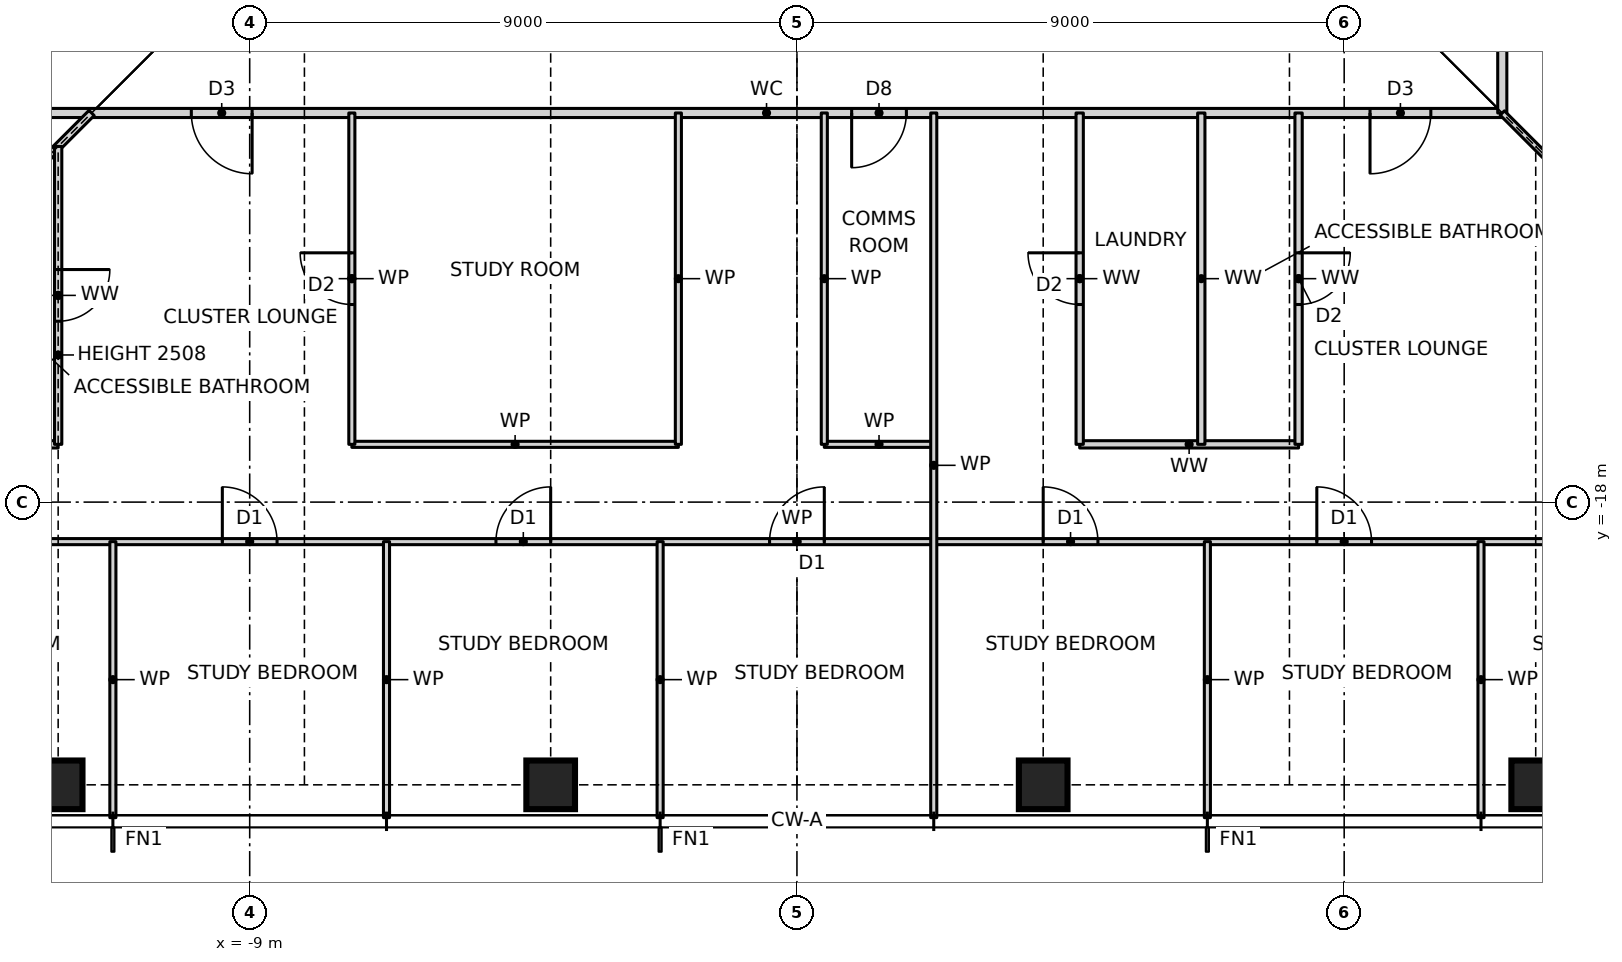
"""IFC4 building model, lengths in metres.
Left out: names, types, materials, properties, quantities, classifications, styles, units other than length and angle.
Written with IfcOpenShell. Run it as: python <this file> out.ifc"""

import sys

from ifc_helpers import new_model, si_unit, direction, frame, frame_2d, origin, origin_2d, place, context, subcontext, project, spatial, rectangle, hollow_rectangle, extrude, element, fill, save


model = new_model("IFC4")
c1 = context("Model", 3, precision=1e-05, world=origin(), true_north=direction((0.0, 1.0)))
c2 = subcontext(c1, "Body", "Model", "MODEL_VIEW")
j1 = project(units=[si_unit("LENGTHUNIT", "METRE"), si_unit("PLANEANGLEUNIT", "RADIAN")], contexts=[c1])
p1 = place(None, origin())
s1 = spatial("IfcSite", under=j1, at=p1, CompositionType="ELEMENT")
p2 = place(p1, origin())
s2 = spatial("IfcBuilding", under=s1, at=p2, CompositionType="ELEMENT")
p3 = place(p2, frame((0.0, 0.0, 46.5)))
s3 = spatial("IfcBuildingStorey", under=s2, at=p3, CompositionType="ELEMENT", Elevation=46.5)
for number, where, z_axis, x_axis in (
    (1, (-12.15, -22.65, 0.0), (0.0, 0.0, 1.0), (1.0, 0.0, 0.0)),
    (2, (-4.05, -22.65, 0.0), (0.0, 0.0, 1.0), (1.0, 0.0, 0.0)),
    (3, (4.05, -22.65, 0.0), (0.0, 0.0, 1.0), (1.0, 0.0, 0.0)),
    (4, (12.15, -22.65, 0.0), (0.0, 0.0, 1.0), (1.0, 0.0, 0.0)),
):
    element("IfcColumn", number, at=place(p3, frame(where, z_axis=z_axis, x_axis=x_axis)), inside=s3, PredefinedType="COLUMN", context=c2, shape_type="SweptSolid", body=[
        extrude(hollow_rectangle(XDim=0.8, YDim=0.8, WallThickness=0.09, at=origin_2d()), origin(), (0.0, 0.0, 1.0), 3.5),
    ])
p4 = place(p3, frame((-15.75, -18.65, 0.0), z_axis=(0.0, 0.0, 1.0), x_axis=(1.0, 0.0, 0.0)))
e5 = element("IfcWall", 5, at=p4, inside=s3, PredefinedType="PARTITIONING", context=c2, shape_type="SweptSolid", body=[
    extrude(rectangle(XDim=31.5, YDim=0.1, at=frame_2d((15.75, 0.0))), origin(), (0.0, 0.0, 1.0), 3.27),
])
p5 = place(p4, frame((1.8, 0.0, 0.0)))
e6 = element("IfcOpeningElement", 6, at=p5, cuts=e5, PredefinedType="OPENING", context=c2, shape_type="SweptSolid", body=[
    extrude(rectangle(XDim=0.9, YDim=2.1, at=frame_2d((0.45, 1.05))), frame((0.0, 0.06, 0.0), z_axis=(0.0, -1.0, 0.0), x_axis=(1.0, 0.0, 0.0)), (0.0, 0.0, 1.0), 0.12),
])
p6 = place(p4, frame((6.3, 0.0, 0.0)))
e7 = element("IfcOpeningElement", 7, at=p6, cuts=e5, PredefinedType="OPENING", context=c2, shape_type="SweptSolid", body=[
    extrude(rectangle(XDim=0.9, YDim=2.1, at=frame_2d((0.45, 1.05))), frame((0.0, 0.06, 0.0), z_axis=(0.0, -1.0, 0.0), x_axis=(1.0, 0.0, 0.0)), (0.0, 0.0, 1.0), 0.12),
])
p7 = place(p4, frame((10.8, 0.0, 0.0)))
e8 = element("IfcOpeningElement", 8, at=p7, cuts=e5, PredefinedType="OPENING", context=c2, shape_type="SweptSolid", body=[
    extrude(rectangle(XDim=0.9, YDim=2.1, at=frame_2d((0.45, 1.05))), frame((0.0, 0.06, 0.0), z_axis=(0.0, -1.0, 0.0), x_axis=(1.0, 0.0, 0.0)), (0.0, 0.0, 1.0), 0.12),
])
p8 = place(p4, frame((15.3, 0.0, 0.0)))
e9 = element("IfcOpeningElement", 9, at=p8, cuts=e5, PredefinedType="OPENING", context=c2, shape_type="SweptSolid", body=[
    extrude(rectangle(XDim=0.9, YDim=2.1, at=frame_2d((0.45, 1.05))), frame((0.0, 0.06, 0.0), z_axis=(0.0, -1.0, 0.0), x_axis=(1.0, 0.0, 0.0)), (0.0, 0.0, 1.0), 0.12),
])
p9 = place(p4, frame((19.8, 0.0, 0.0)))
e10 = element("IfcOpeningElement", 10, at=p9, cuts=e5, PredefinedType="OPENING", context=c2, shape_type="SweptSolid", body=[
    extrude(rectangle(XDim=0.9, YDim=2.1, at=frame_2d((0.45, 1.05))), frame((0.0, 0.06, 0.0), z_axis=(0.0, -1.0, 0.0), x_axis=(1.0, 0.0, 0.0)), (0.0, 0.0, 1.0), 0.12),
])
p10 = place(p4, frame((24.3, 0.0, 0.0)))
e11 = element("IfcOpeningElement", 11, at=p10, cuts=e5, PredefinedType="OPENING", context=c2, shape_type="SweptSolid", body=[
    extrude(rectangle(XDim=0.9, YDim=2.1, at=frame_2d((0.45, 1.05))), frame((0.0, 0.06, 0.0), z_axis=(0.0, -1.0, 0.0), x_axis=(1.0, 0.0, 0.0)), (0.0, 0.0, 1.0), 0.12),
])
p11 = place(p4, frame((28.8, 0.0, 0.0)))
e12 = element("IfcOpeningElement", 12, at=p11, cuts=e5, PredefinedType="OPENING", context=c2, shape_type="SweptSolid", body=[
    extrude(rectangle(XDim=0.9, YDim=2.1, at=frame_2d((0.45, 1.05))), frame((0.0, 0.06, 0.0), z_axis=(0.0, -1.0, 0.0), x_axis=(1.0, 0.0, 0.0)), (0.0, 0.0, 1.0), 0.12),
])
p12 = place(p3, frame((-15.75, -17.05, 0.0), z_axis=(0.0, 0.0, 1.0), x_axis=(1.0, 0.0, 0.0)))
e13 = element("IfcWall", 13, at=p12, inside=s3, PredefinedType="PARTITIONING", context=c2, shape_type="SweptSolid", body=[
    extrude(rectangle(XDim=3.6, YDim=0.12, at=frame_2d((1.8, 0.0))), origin(), (0.0, 0.0, 1.0), 3.27),
])
p13 = place(p12, frame((0.575, 0.0, 0.0)))
e14 = element("IfcOpeningElement", 14, at=p13, cuts=e13, PredefinedType="OPENING", context=c2, shape_type="SweptSolid", body=[
    extrude(rectangle(XDim=0.85, YDim=2.1, at=frame_2d((0.425, 1.05))), frame((0.0, 0.07, 0.0), z_axis=(0.0, -1.0, 0.0), x_axis=(1.0, 0.0, 0.0)), (0.0, 0.0, 1.0), 0.14),
])
p14 = place(p3, frame((-7.32, -17.05, 0.0), z_axis=(0.0, 0.0, 1.0), x_axis=(1.0, 0.0, 0.0)))
e15 = element("IfcWall", 15, at=p14, inside=s3, PredefinedType="PARTITIONING", context=c2, shape_type="SweptSolid", body=[
    extrude(rectangle(XDim=5.37, YDim=0.1, at=frame_2d((2.685, 0.0))), origin(), (0.0, 0.0, 1.0), 3.27),
])
p15 = place(p3, frame((0.45, -17.05, 0.0), z_axis=(0.0, 0.0, 1.0), x_axis=(1.0, 0.0, 0.0)))
e16 = element("IfcWall", 16, at=p15, inside=s3, PredefinedType="PARTITIONING", context=c2, shape_type="SweptSolid", body=[
    extrude(rectangle(XDim=1.8, YDim=0.1, at=frame_2d((0.9, 0.0))), origin(), (0.0, 0.0, 1.0), 3.27),
])
p16 = place(p3, frame((4.65, -17.05, 0.0), z_axis=(0.0, 0.0, 1.0), x_axis=(1.0, 0.0, 0.0)))
e17 = element("IfcWall", 17, at=p16, inside=s3, PredefinedType="PARTITIONING", context=c2, shape_type="SweptSolid", body=[
    extrude(rectangle(XDim=3.6, YDim=0.12, at=frame_2d((1.8, 0.0))), origin(), (0.0, 0.0, 1.0), 3.27),
])
p17 = place(p3, frame((-12.6, -11.6, 0.0), z_axis=(0.0, 0.0, 1.0), x_axis=(1.0, 0.0, 0.0)))
e18 = element("IfcWall", 18, at=p17, inside=s3, PredefinedType="PARTITIONING", context=c2, shape_type="SweptSolid", body=[
    extrude(rectangle(XDim=24.2, YDim=0.15, at=frame_2d((12.1, 0.0))), origin(), (0.0, 0.0, 1.0), 3.27),
])
p18 = place(p17, frame((2.64, 0.0, 0.0)))
e19 = element("IfcOpeningElement", 19, at=p18, cuts=e18, PredefinedType="OPENING", context=c2, shape_type="SweptSolid", body=[
    extrude(rectangle(XDim=1.0, YDim=2.1, at=frame_2d((0.5, 1.05))), frame((0.0, 0.085, 0.0), z_axis=(0.0, -1.0, 0.0), x_axis=(1.0, 0.0, 0.0)), (0.0, 0.0, 1.0), 0.17),
])
p19 = place(p17, frame((13.5, 0.0, 0.0)))
e20 = element("IfcOpeningElement", 20, at=p19, cuts=e18, PredefinedType="OPENING", context=c2, shape_type="SweptSolid", body=[
    extrude(rectangle(XDim=0.9, YDim=2.1, at=frame_2d((0.45, 1.05))), frame((0.0, 0.085, 0.0), z_axis=(0.0, -1.0, 0.0), x_axis=(1.0, 0.0, 0.0)), (0.0, 0.0, 1.0), 0.17),
])
p20 = place(p17, frame((22.025, 0.0, 0.0)))
e21 = element("IfcOpeningElement", 21, at=p20, cuts=e18, PredefinedType="OPENING", context=c2, shape_type="SweptSolid", body=[
    extrude(rectangle(XDim=1.0, YDim=2.1, at=frame_2d((0.5, 1.05))), frame((0.0, 0.085, 0.0), z_axis=(0.0, -1.0, 0.0), x_axis=(1.0, 0.0, 0.0)), (0.0, 0.0, 1.0), 0.17),
])
p21 = place(p3, frame((-15.75, -15.75, 0.0), z_axis=(0.0, 0.0, 1.0), x_axis=(0.707106781187, 0.707106781187, 0.0)))
e22 = element("IfcWall", 22, at=p21, inside=s3, PredefinedType="PARTITIONING", context=c2, shape_type="SweptSolid", body=[
    extrude(rectangle(XDim=5.869, YDim=0.12, at=frame_2d((2.935, 0.0))), origin(), (0.0, 0.0, 1.0), 2.343),
])
p22 = place(p3, frame((11.6, -11.6, 0.0), z_axis=(0.0, 0.0, 1.0), x_axis=(0.0, 1.0, 0.0)))
e23 = element("IfcWall", 23, at=p22, inside=s3, PredefinedType="PARTITIONING", context=c2, shape_type="SweptSolid", body=[
    extrude(rectangle(XDim=23.2, YDim=0.15, at=frame_2d((11.6, 0.0))), origin(), (0.0, 0.0, 1.0), 3.27),
])
p23 = place(p22, frame((20.55, 0.0, 0.0)))
e24 = element("IfcOpeningElement", 24, at=p23, cuts=e23, PredefinedType="OPENING", context=c2, shape_type="SweptSolid", body=[
    extrude(rectangle(XDim=1.0, YDim=2.1, at=frame_2d((0.5, 1.05))), frame((0.0, 0.085, 0.0), z_axis=(0.0, -1.0, 0.0), x_axis=(1.0, 0.0, 0.0)), (0.0, 0.0, 1.0), 0.17),
])
p24 = place(p3, frame((11.25, -23.19, 0.0), z_axis=(0.0, 0.0, 1.0), x_axis=(0.0, 1.0, 0.0)))
e25 = element("IfcWall", 25, at=p24, inside=s3, PredefinedType="PARTITIONING", context=c2, shape_type="SweptSolid", body=[
    extrude(rectangle(XDim=4.54, YDim=0.1, at=frame_2d((2.27, 0.0))), origin(), (0.0, 0.0, 1.0), 3.27),
])
p25 = place(p3, frame((8.25, -17.05, 0.0), z_axis=(0.0, 0.0, 1.0), x_axis=(0.0, 1.0, 0.0)))
e26 = element("IfcWall", 26, at=p25, inside=s3, PredefinedType="PARTITIONING", context=c2, shape_type="SweptSolid", body=[
    extrude(rectangle(XDim=5.45, YDim=0.12, at=frame_2d((2.725, 0.0))), origin(), (0.0, 0.0, 1.0), 3.27),
])
p26 = place(p25, frame((2.3, 0.0, 0.0)))
e27 = element("IfcOpeningElement", 27, at=p26, cuts=e26, PredefinedType="OPENING", context=c2, shape_type="SweptSolid", body=[
    extrude(rectangle(XDim=0.85, YDim=2.1, at=frame_2d((0.425, 1.05))), frame((0.0, 0.07, 0.0), z_axis=(0.0, -1.0, 0.0), x_axis=(1.0, 0.0, 0.0)), (0.0, 0.0, 1.0), 0.14),
])
p27 = place(p3, frame((6.75, -23.19, 0.0), z_axis=(0.0, 0.0, 1.0), x_axis=(0.0, 1.0, 0.0)))
e28 = element("IfcWall", 28, at=p27, inside=s3, PredefinedType="PARTITIONING", context=c2, shape_type="SweptSolid", body=[
    extrude(rectangle(XDim=4.54, YDim=0.1, at=frame_2d((2.27, 0.0))), origin(), (0.0, 0.0, 1.0), 3.27),
])
p28 = place(p3, frame((6.65, -17.05, 0.0), z_axis=(0.0, 0.0, 1.0), x_axis=(0.0, 1.0, 0.0)))
e29 = element("IfcWall", 29, at=p28, inside=s3, PredefinedType="PARTITIONING", context=c2, shape_type="SweptSolid", body=[
    extrude(rectangle(XDim=5.45, YDim=0.12, at=frame_2d((2.725, 0.0))), origin(), (0.0, 0.0, 1.0), 3.27),
])
p29 = place(p3, frame((4.65, -17.05, 0.0), z_axis=(0.0, 0.0, 1.0), x_axis=(0.0, 1.0, 0.0)))
e30 = element("IfcWall", 30, at=p29, inside=s3, PredefinedType="PARTITIONING", context=c2, shape_type="SweptSolid", body=[
    extrude(rectangle(XDim=5.45, YDim=0.12, at=frame_2d((2.725, 0.0))), origin(), (0.0, 0.0, 1.0), 3.27),
])
p30 = place(p29, frame((2.3, 0.0, 0.0)))
e31 = element("IfcOpeningElement", 31, at=p30, cuts=e30, PredefinedType="OPENING", context=c2, shape_type="SweptSolid", body=[
    extrude(rectangle(XDim=0.85, YDim=2.1, at=frame_2d((0.425, 1.05))), frame((0.0, 0.07, 0.0), z_axis=(0.0, -1.0, 0.0), x_axis=(1.0, 0.0, 0.0)), (0.0, 0.0, 1.0), 0.14),
])
p31 = place(p3, frame((2.25, -23.19, 0.0), z_axis=(0.0, 0.0, 1.0), x_axis=(0.0, 1.0, 0.0)))
e32 = element("IfcWall", 32, at=p31, inside=s3, PredefinedType="PARTITIONING", context=c2, shape_type="SweptSolid", body=[
    extrude(rectangle(XDim=11.59, YDim=0.1, at=frame_2d((5.795, 0.0))), origin(), (0.0, 0.0, 1.0), 3.27),
])
for number, where, z_axis, x_axis in (
    (33, (0.45, -17.05, 0.0), (0.0, 0.0, 1.0), (0.0, 1.0, 0.0)),
    (34, (-1.95, -17.05, 0.0), (0.0, 0.0, 1.0), (0.0, 1.0, 0.0)),
):
    element("IfcWall", number, at=place(p3, frame(where, z_axis=z_axis, x_axis=x_axis)), inside=s3, PredefinedType="PARTITIONING", context=c2, shape_type="SweptSolid", body=[
        extrude(rectangle(XDim=5.45, YDim=0.1, at=frame_2d((2.725, 0.0))), origin(), (0.0, 0.0, 1.0), 3.27),
    ])
for number, where, z_axis, x_axis in (
    (35, (-2.25, -23.19, 0.0), (0.0, 0.0, 1.0), (0.0, 1.0, 0.0)),
    (36, (-6.75, -23.19, 0.0), (0.0, 0.0, 1.0), (0.0, 1.0, 0.0)),
):
    element("IfcWall", number, at=place(p3, frame(where, z_axis=z_axis, x_axis=x_axis)), inside=s3, PredefinedType="PARTITIONING", context=c2, shape_type="SweptSolid", body=[
        extrude(rectangle(XDim=4.54, YDim=0.1, at=frame_2d((2.27, 0.0))), origin(), (0.0, 0.0, 1.0), 3.27),
    ])
p32 = place(p3, frame((-7.32, -17.05, 0.0), z_axis=(0.0, 0.0, 1.0), x_axis=(0.0, 1.0, 0.0)))
e37 = element("IfcWall", 37, at=p32, inside=s3, PredefinedType="PARTITIONING", context=c2, shape_type="SweptSolid", body=[
    extrude(rectangle(XDim=5.45, YDim=0.1, at=frame_2d((2.725, 0.0))), origin(), (0.0, 0.0, 1.0), 3.27),
])
p33 = place(p32, frame((2.3, 0.0, 0.0)))
e38 = element("IfcOpeningElement", 38, at=p33, cuts=e37, PredefinedType="OPENING", context=c2, shape_type="SweptSolid", body=[
    extrude(rectangle(XDim=0.85, YDim=2.1, at=frame_2d((0.425, 1.05))), frame((0.0, 0.06, 0.0), z_axis=(0.0, -1.0, 0.0), x_axis=(1.0, 0.0, 0.0)), (0.0, 0.0, 1.0), 0.12),
])
p34 = place(p3, frame((-11.25, -23.19, 0.0), z_axis=(0.0, 0.0, 1.0), x_axis=(0.0, 1.0, 0.0)))
e39 = element("IfcWall", 39, at=p34, inside=s3, PredefinedType="PARTITIONING", context=c2, shape_type="SweptSolid", body=[
    extrude(rectangle(XDim=4.54, YDim=0.1, at=frame_2d((2.27, 0.0))), origin(), (0.0, 0.0, 1.0), 3.27),
])
p35 = place(p3, frame((-12.15, -17.05, 0.0), z_axis=(0.0, 0.0, 1.0), x_axis=(0.0, 1.0, 0.0)))
e40 = element("IfcWall", 40, at=p35, inside=s3, PredefinedType="PARTITIONING", context=c2, shape_type="SweptSolid", body=[
    extrude(rectangle(XDim=4.9, YDim=0.12, at=frame_2d((2.45, 0.0))), origin(), (0.0, 0.0, 1.0), 2.508),
])
p36 = place(p35, frame((2.025, 0.0, 0.0)))
e41 = element("IfcOpeningElement", 41, at=p36, cuts=e40, PredefinedType="OPENING", context=c2, shape_type="SweptSolid", body=[
    extrude(rectangle(XDim=0.85, YDim=2.1, at=frame_2d((0.425, 1.05))), frame((0.0, 0.07, 0.0), z_axis=(0.0, -1.0, 0.0), x_axis=(1.0, 0.0, 0.0)), (0.0, 0.0, 1.0), 0.14),
])
p37 = place(p3, frame((15.75, -15.75, 0.0), z_axis=(0.0, 0.0, 1.0), x_axis=(-0.707106781187, 0.707106781187, 0.0)))
e42 = element("IfcWall", 42, at=p37, inside=s3, PredefinedType="PARTITIONING", context=c2, shape_type="SweptSolid", body=[
    extrude(rectangle(XDim=5.869, YDim=0.1, at=frame_2d((2.935, 0.0))), origin(), (0.0, 0.0, 1.0), 2.343),
])
p38 = place(p6, origin())
e43 = element("IfcDoor", 43, at=p38, inside=s3, OperationType="SINGLE_SWING_LEFT", PredefinedType="DOOR", context=c2, shape_type="SweptSolid", body=[
    extrude(rectangle(XDim=0.9, YDim=2.1, at=frame_2d((0.45, 1.05))), frame((0.0, 0.025, 0.0), z_axis=(0.0, -1.0, 0.0), x_axis=(1.0, 0.0, 0.0)), (0.0, 0.0, 1.0), 0.05),
])
fill(e7, e43)
p39 = place(p7, origin())
e44 = element("IfcDoor", 44, at=p39, inside=s3, OperationType="SINGLE_SWING_RIGHT", PredefinedType="DOOR", context=c2, shape_type="SweptSolid", body=[
    extrude(rectangle(XDim=0.9, YDim=2.1, at=frame_2d((0.45, 1.05))), frame((0.0, 0.025, 0.0), z_axis=(0.0, -1.0, 0.0), x_axis=(1.0, 0.0, 0.0)), (0.0, 0.0, 1.0), 0.05),
])
fill(e8, e44)
p40 = place(p8, origin())
e45 = element("IfcDoor", 45, at=p40, inside=s3, OperationType="SINGLE_SWING_RIGHT", PredefinedType="DOOR", context=c2, shape_type="SweptSolid", body=[
    extrude(rectangle(XDim=0.9, YDim=2.1, at=frame_2d((0.45, 1.05))), frame((0.0, 0.025, 0.0), z_axis=(0.0, -1.0, 0.0), x_axis=(1.0, 0.0, 0.0)), (0.0, 0.0, 1.0), 0.05),
])
fill(e9, e45)
p41 = place(p18, frame((1.0, 0.0, 0.0), z_axis=(0.0, 0.0, 1.0), x_axis=(-1.0, 0.0, 0.0)))
e46 = element("IfcDoor", 46, at=p41, inside=s3, OperationType="SINGLE_SWING_LEFT", PredefinedType="DOOR", context=c2, shape_type="SweptSolid", body=[
    extrude(rectangle(XDim=1.0, YDim=2.1, at=frame_2d((0.5, 1.05))), frame((0.0, 0.025, 0.0), z_axis=(0.0, -1.0, 0.0), x_axis=(1.0, 0.0, 0.0)), (0.0, 0.0, 1.0), 0.05),
])
fill(e19, e46)
p42 = place(p36, frame((0.85, 0.0, 0.0), z_axis=(0.0, 0.0, 1.0), x_axis=(-1.0, 0.0, 0.0)))
e47 = element("IfcDoor", 47, at=p42, inside=s3, OperationType="SINGLE_SWING_LEFT", PredefinedType="DOOR", context=c2, shape_type="SweptSolid", body=[
    extrude(rectangle(XDim=0.85, YDim=2.1, at=frame_2d((0.425, 1.05))), frame((0.0, 0.025, 0.0), z_axis=(0.0, -1.0, 0.0), x_axis=(1.0, 0.0, 0.0)), (0.0, 0.0, 1.0), 0.05),
])
fill(e41, e47)
p43 = place(p33, origin())
e48 = element("IfcDoor", 48, at=p43, inside=s3, OperationType="SINGLE_SWING_RIGHT", PredefinedType="DOOR", context=c2, shape_type="SweptSolid", body=[
    extrude(rectangle(XDim=0.85, YDim=2.1, at=frame_2d((0.425, 1.05))), frame((0.0, 0.025, 0.0), z_axis=(0.0, -1.0, 0.0), x_axis=(1.0, 0.0, 0.0)), (0.0, 0.0, 1.0), 0.05),
])
fill(e38, e48)
p44 = place(p19, frame((0.9, 0.0, 0.0), z_axis=(0.0, 0.0, 1.0), x_axis=(-1.0, 0.0, 0.0)))
e49 = element("IfcDoor", 49, at=p44, inside=s3, OperationType="SINGLE_SWING_RIGHT", PredefinedType="DOOR", context=c2, shape_type="SweptSolid", body=[
    extrude(rectangle(XDim=0.9, YDim=2.1, at=frame_2d((0.45, 1.05))), frame((0.0, 0.025, 0.0), z_axis=(0.0, -1.0, 0.0), x_axis=(1.0, 0.0, 0.0)), (0.0, 0.0, 1.0), 0.05),
])
fill(e20, e49)
p45 = place(p9, origin())
e50 = element("IfcDoor", 50, at=p45, inside=s3, OperationType="SINGLE_SWING_LEFT", PredefinedType="DOOR", context=c2, shape_type="SweptSolid", body=[
    extrude(rectangle(XDim=0.9, YDim=2.1, at=frame_2d((0.45, 1.05))), frame((0.0, 0.025, 0.0), z_axis=(0.0, -1.0, 0.0), x_axis=(1.0, 0.0, 0.0)), (0.0, 0.0, 1.0), 0.05),
])
fill(e10, e50)
p46 = place(p10, origin())
e51 = element("IfcDoor", 51, at=p46, inside=s3, OperationType="SINGLE_SWING_LEFT", PredefinedType="DOOR", context=c2, shape_type="SweptSolid", body=[
    extrude(rectangle(XDim=0.9, YDim=2.1, at=frame_2d((0.45, 1.05))), frame((0.0, 0.025, 0.0), z_axis=(0.0, -1.0, 0.0), x_axis=(1.0, 0.0, 0.0)), (0.0, 0.0, 1.0), 0.05),
])
fill(e11, e51)
p47 = place(p20, frame((1.0, 0.0, 0.0), z_axis=(0.0, 0.0, 1.0), x_axis=(-1.0, 0.0, 0.0)))
e52 = element("IfcDoor", 52, at=p47, inside=s3, OperationType="SINGLE_SWING_RIGHT", PredefinedType="DOOR", context=c2, shape_type="SweptSolid", body=[
    extrude(rectangle(XDim=1.0, YDim=2.1, at=frame_2d((0.5, 1.05))), frame((0.0, 0.025, 0.0), z_axis=(0.0, -1.0, 0.0), x_axis=(1.0, 0.0, 0.0)), (0.0, 0.0, 1.0), 0.05),
])
fill(e21, e52)
p48 = place(p30, origin())
e53 = element("IfcDoor", 53, at=p48, inside=s3, OperationType="SINGLE_SWING_RIGHT", PredefinedType="DOOR", context=c2, shape_type="SweptSolid", body=[
    extrude(rectangle(XDim=0.85, YDim=2.1, at=frame_2d((0.425, 1.05))), frame((0.0, 0.025, 0.0), z_axis=(0.0, -1.0, 0.0), x_axis=(1.0, 0.0, 0.0)), (0.0, 0.0, 1.0), 0.05),
])
fill(e31, e53)
p49 = place(p26, frame((0.85, 0.0, 0.0), z_axis=(0.0, 0.0, 1.0), x_axis=(-1.0, 0.0, 0.0)))
e54 = element("IfcDoor", 54, at=p49, inside=s3, OperationType="SINGLE_SWING_LEFT", PredefinedType="DOOR", context=c2, shape_type="SweptSolid", body=[
    extrude(rectangle(XDim=0.85, YDim=2.1, at=frame_2d((0.425, 1.05))), frame((0.0, 0.025, 0.0), z_axis=(0.0, -1.0, 0.0), x_axis=(1.0, 0.0, 0.0)), (0.0, 0.0, 1.0), 0.05),
])
fill(e27, e54)
save(model, sys.argv[1])
